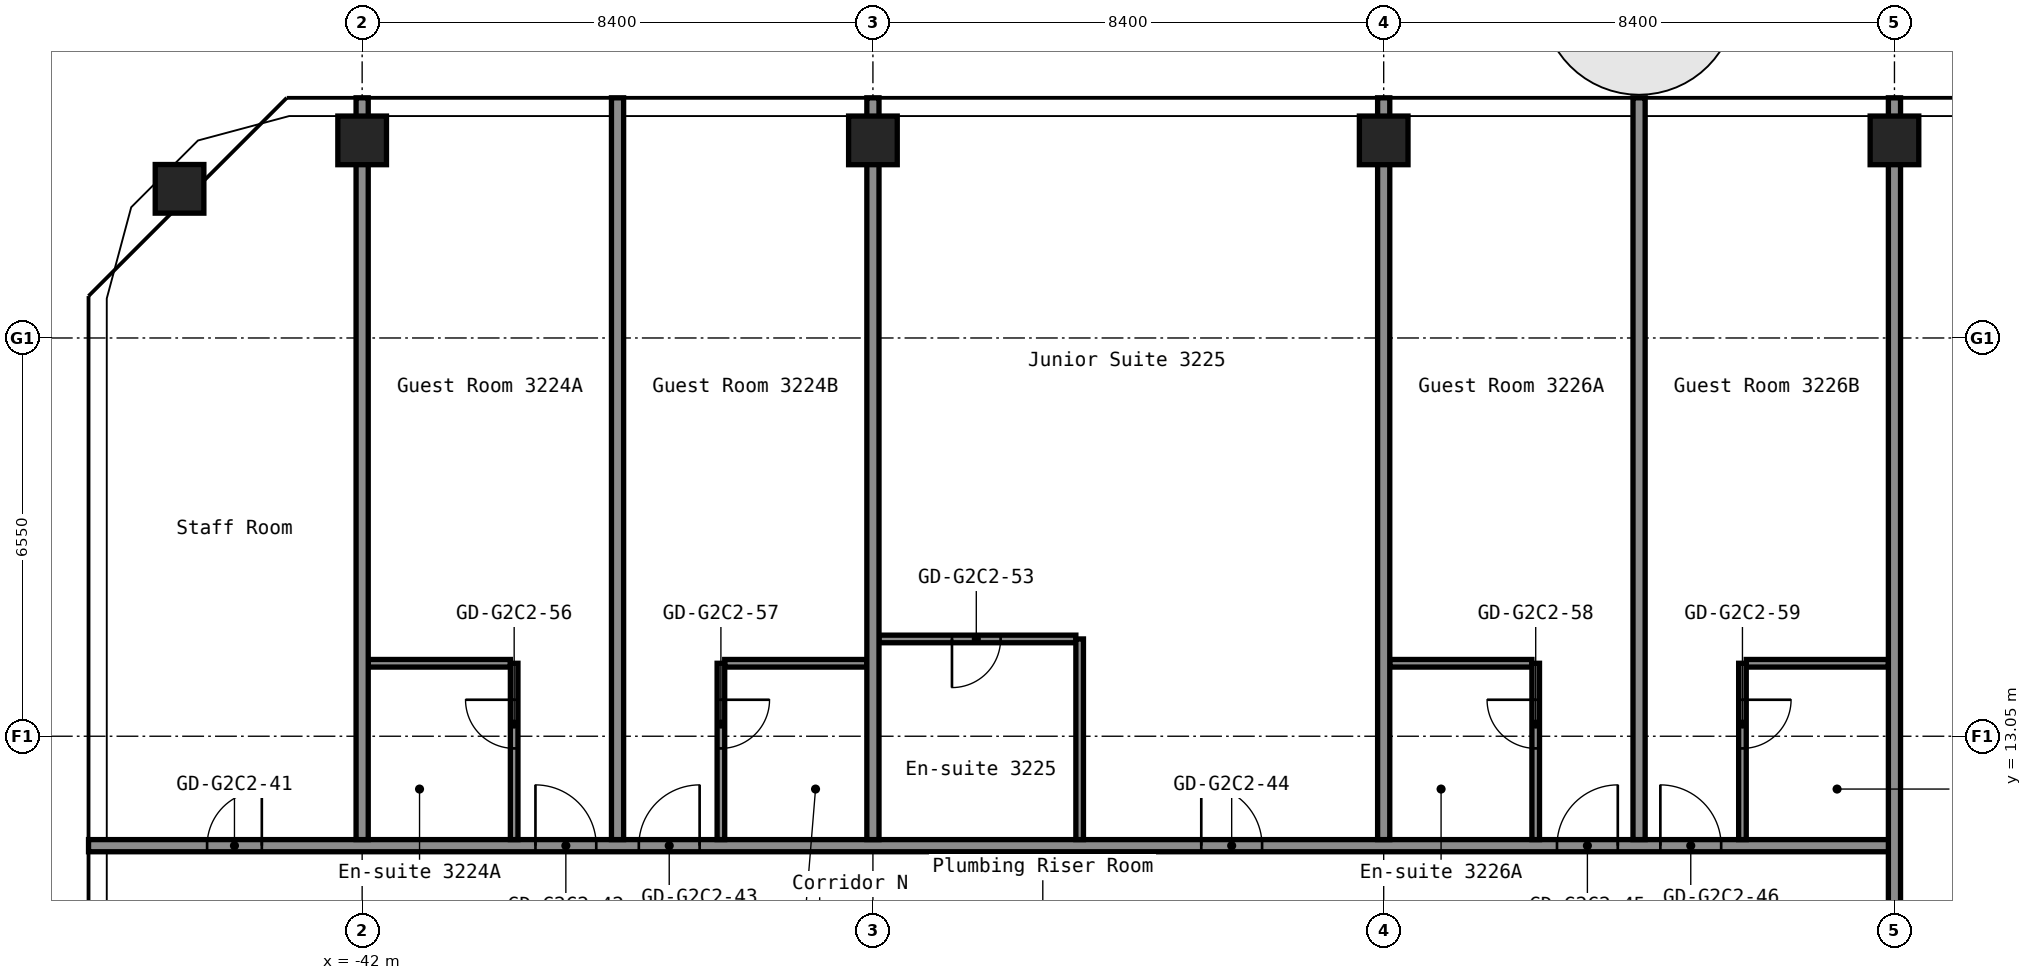
"""IFC4 building model, lengths in metres.
Left out: names, types, materials, properties, quantities, classifications, styles, units other than length and angle.
Written with IfcOpenShell. Run it as: python <this file> out.ifc"""

import sys

from ifc_helpers import new_model, si_unit, direction, frame, frame_2d, origin, origin_2d, place, context, subcontext, project, spatial, rectangle, hollow_rectangle, extrude, element, fill, save


model = new_model("IFC4")
c1 = context("Model", 3, precision=1e-05, world=origin(), true_north=direction((0.0, 1.0)))
c2 = subcontext(c1, "Body", "Model", "MODEL_VIEW")
j1 = project(units=[si_unit("LENGTHUNIT", "METRE"), si_unit("PLANEANGLEUNIT", "RADIAN")], contexts=[c1])
p1 = place(None, origin())
s1 = spatial("IfcSite", under=j1, at=p1, CompositionType="ELEMENT")
p2 = place(p1, origin())
s2 = spatial("IfcBuilding", under=s1, at=p2, CompositionType="ELEMENT")
p3 = place(p2, frame((0.0, 0.0, 113.8)))
s3 = spatial("IfcBuildingStorey", under=s2, at=p3, CompositionType="ELEMENT", Elevation=113.8)
for number, where, z_axis, x_axis in (
    (1, (-45.003, 22.053, 0.0), (0.0, 0.0, 1.0), (1.0, 0.0, 0.0)),
    (2, (-42.0, 22.85, 0.0), (0.0, 0.0, 1.0), (1.0, 0.0, 0.0)),
    (3, (-33.6, 22.85, 0.0), (0.0, 0.0, 1.0), (1.0, 0.0, 0.0)),
    (4, (-25.2, 22.85, 0.0), (0.0, 0.0, 1.0), (1.0, 0.0, 0.0)),
    (5, (-16.8, 22.85, 0.0), (0.0, 0.0, 1.0), (1.0, 0.0, 0.0)),
):
    element("IfcColumn", number, at=place(p3, frame(where, z_axis=z_axis, x_axis=x_axis)), inside=s3, PredefinedType="COLUMN", context=c2, shape_type="SweptSolid", body=[
        extrude(hollow_rectangle(XDim=0.8, YDim=0.8, WallThickness=0.032, at=origin_2d()), origin(), (0.0, 0.0, 1.0), 2.8),
    ])
p4 = place(p3, frame((-46.5, 11.25, 0.0), z_axis=(0.0, 0.0, 1.0), x_axis=(1.0, 0.0, 0.0)))
e6 = element("IfcWall", 6, at=p4, inside=s3, PredefinedType="PARTITIONING", context=c2, shape_type="SweptSolid", body=[
    extrude(rectangle(XDim=29.7, YDim=0.2, at=frame_2d((14.85, 0.0))), origin(), (0.0, 0.0, 1.0), 2.8),
])
p5 = place(p4, frame((1.95, 0.0, 0.0)))
e7 = element("IfcOpeningElement", 7, at=p5, cuts=e6, PredefinedType="OPENING", context=c2, shape_type="SweptSolid", body=[
    extrude(rectangle(XDim=0.9, YDim=2.1, at=frame_2d((0.45, 1.05))), frame((0.0, 0.11, 0.0), z_axis=(0.0, -1.0, 0.0), x_axis=(1.0, 0.0, 0.0)), (0.0, 0.0, 1.0), 0.22),
])
p6 = place(p4, frame((7.35, 0.0, 0.0)))
e8 = element("IfcOpeningElement", 8, at=p6, cuts=e6, PredefinedType="OPENING", context=c2, shape_type="SweptSolid", body=[
    extrude(rectangle(XDim=1.0, YDim=2.1, at=frame_2d((0.5, 1.05))), frame((0.0, 0.11, 0.0), z_axis=(0.0, -1.0, 0.0), x_axis=(1.0, 0.0, 0.0)), (0.0, 0.0, 1.0), 0.22),
])
p7 = place(p4, frame((9.05, 0.0, 0.0)))
e9 = element("IfcOpeningElement", 9, at=p7, cuts=e6, PredefinedType="OPENING", context=c2, shape_type="SweptSolid", body=[
    extrude(rectangle(XDim=1.0, YDim=2.1, at=frame_2d((0.5, 1.05))), frame((0.0, 0.11, 0.0), z_axis=(0.0, -1.0, 0.0), x_axis=(1.0, 0.0, 0.0)), (0.0, 0.0, 1.0), 0.22),
])
p8 = place(p4, frame((18.3, 0.0, 0.0)))
e10 = element("IfcOpeningElement", 10, at=p8, cuts=e6, PredefinedType="OPENING", context=c2, shape_type="SweptSolid", body=[
    extrude(rectangle(XDim=1.0, YDim=2.1, at=frame_2d((0.5, 1.05))), frame((0.0, 0.11, 0.0), z_axis=(0.0, -1.0, 0.0), x_axis=(1.0, 0.0, 0.0)), (0.0, 0.0, 1.0), 0.22),
])
p9 = place(p4, frame((24.15, 0.0, 0.0)))
e11 = element("IfcOpeningElement", 11, at=p9, cuts=e6, PredefinedType="OPENING", context=c2, shape_type="SweptSolid", body=[
    extrude(rectangle(XDim=1.0, YDim=2.1, at=frame_2d((0.5, 1.05))), frame((0.0, 0.11, 0.0), z_axis=(0.0, -1.0, 0.0), x_axis=(1.0, 0.0, 0.0)), (0.0, 0.0, 1.0), 0.22),
])
p10 = place(p4, frame((25.85, 0.0, 0.0)))
e12 = element("IfcOpeningElement", 12, at=p10, cuts=e6, PredefinedType="OPENING", context=c2, shape_type="SweptSolid", body=[
    extrude(rectangle(XDim=1.0, YDim=2.1, at=frame_2d((0.5, 1.05))), frame((0.0, 0.11, 0.0), z_axis=(0.0, -1.0, 0.0), x_axis=(1.0, 0.0, 0.0)), (0.0, 0.0, 1.0), 0.22),
])
p11 = place(p3, frame((-41.9, 14.25, 0.0), z_axis=(0.0, 0.0, 1.0), x_axis=(1.0, 0.0, 0.0)))
e13 = element("IfcWall", 13, at=p11, inside=s3, PredefinedType="PARTITIONING", context=c2, shape_type="SweptSolid", body=[
    extrude(rectangle(XDim=2.337, YDim=0.125, at=frame_2d((1.169, 0.0))), origin(), (0.0, 0.0, 1.0), 2.8),
])
for number, where, z_axis, x_axis in (
    (14, (-36.038, 14.25, 0.0), (0.0, 0.0, 1.0), (1.0, 0.0, 0.0)),
    (15, (-25.1, 14.25, 0.0), (0.0, 0.0, 1.0), (1.0, 0.0, 0.0)),
    (16, (-19.238, 14.25, 0.0), (0.0, 0.0, 1.0), (1.0, 0.0, 0.0)),
):
    element("IfcWall", number, at=place(p3, frame(where, z_axis=z_axis, x_axis=x_axis)), inside=s3, PredefinedType="PARTITIONING", context=c2, shape_type="SweptSolid", body=[
        extrude(rectangle(XDim=2.338, YDim=0.125, at=frame_2d((1.169, 0.0))), origin(), (0.0, 0.0, 1.0), 2.8),
    ])
p12 = place(p3, frame((-33.5, 14.65, 0.0), z_axis=(0.0, 0.0, 1.0), x_axis=(1.0, 0.0, 0.0)))
e17 = element("IfcWall", 17, at=p12, inside=s3, PredefinedType="PARTITIONING", context=c2, shape_type="SweptSolid", body=[
    extrude(rectangle(XDim=3.238, YDim=0.125, at=frame_2d((1.619, 0.0))), origin(), (0.0, 0.0, 1.0), 2.8),
])
p13 = place(p12, frame((1.2, 0.0, 0.0)))
e18 = element("IfcOpeningElement", 18, at=p13, cuts=e17, PredefinedType="OPENING", context=c2, shape_type="SweptSolid", body=[
    extrude(rectangle(XDim=0.8, YDim=2.1, at=frame_2d((0.4, 1.05))), frame((0.0, 0.073, 0.0), z_axis=(0.0, -1.0, 0.0), x_axis=(1.0, 0.0, 0.0)), (0.0, 0.0, 1.0), 0.145),
])
p14 = place(p3, frame((-42.0, 11.35, 0.0), z_axis=(0.0, 0.0, 1.0), x_axis=(0.0, 1.0, 0.0)))
e19 = element("IfcWall", 19, at=p14, inside=s3, PredefinedType="PARTITIONING", context=c2, shape_type="SweptSolid", body=[
    extrude(rectangle(XDim=12.2, YDim=0.2, at=frame_2d((6.1, 0.0))), origin(), (0.0, 0.0, 1.0), 2.8),
])
p15 = place(p3, frame((-39.5, 11.35, 0.0), z_axis=(0.0, 0.0, 1.0), x_axis=(0.0, 1.0, 0.0)))
e20 = element("IfcWall", 20, at=p15, inside=s3, PredefinedType="PARTITIONING", context=c2, shape_type="SweptSolid", body=[
    extrude(rectangle(XDim=2.9, YDim=0.125, at=frame_2d((1.45, 0.0))), origin(), (0.0, 0.0, 1.0), 2.8),
])
p16 = place(p15, frame((1.5, 0.0, 0.0)))
e21 = element("IfcOpeningElement", 21, at=p16, cuts=e20, PredefinedType="OPENING", context=c2, shape_type="SweptSolid", body=[
    extrude(rectangle(XDim=0.8, YDim=2.1, at=frame_2d((0.4, 1.05))), frame((0.0, 0.073, 0.0), z_axis=(0.0, -1.0, 0.0), x_axis=(1.0, 0.0, 0.0)), (0.0, 0.0, 1.0), 0.145),
])
p17 = place(p3, frame((-37.8, 11.35, 0.0), z_axis=(0.0, 0.0, 1.0), x_axis=(0.0, 1.0, 0.0)))
e22 = element("IfcWall", 22, at=p17, inside=s3, PredefinedType="PARTITIONING", context=c2, shape_type="SweptSolid", body=[
    extrude(rectangle(XDim=12.2, YDim=0.2, at=frame_2d((6.1, 0.0))), origin(), (0.0, 0.0, 1.0), 2.8),
])
p18 = place(p3, frame((-36.1, 11.35, 0.0), z_axis=(0.0, 0.0, 1.0), x_axis=(0.0, 1.0, 0.0)))
e23 = element("IfcWall", 23, at=p18, inside=s3, PredefinedType="PARTITIONING", context=c2, shape_type="SweptSolid", body=[
    extrude(rectangle(XDim=2.9, YDim=0.125, at=frame_2d((1.45, 0.0))), origin(), (0.0, 0.0, 1.0), 2.8),
])
p19 = place(p18, frame((1.5, 0.0, 0.0)))
e24 = element("IfcOpeningElement", 24, at=p19, cuts=e23, PredefinedType="OPENING", context=c2, shape_type="SweptSolid", body=[
    extrude(rectangle(XDim=0.8, YDim=2.1, at=frame_2d((0.4, 1.05))), frame((0.0, 0.073, 0.0), z_axis=(0.0, -1.0, 0.0), x_axis=(1.0, 0.0, 0.0)), (0.0, 0.0, 1.0), 0.145),
])
p20 = place(p3, frame((-33.6, 11.35, 0.0), z_axis=(0.0, 0.0, 1.0), x_axis=(0.0, 1.0, 0.0)))
e25 = element("IfcWall", 25, at=p20, inside=s3, PredefinedType="PARTITIONING", context=c2, shape_type="SweptSolid", body=[
    extrude(rectangle(XDim=12.2, YDim=0.2, at=frame_2d((6.1, 0.0))), origin(), (0.0, 0.0, 1.0), 2.8),
])
p21 = place(p3, frame((-30.2, 11.35, 0.0), z_axis=(0.0, 0.0, 1.0), x_axis=(0.0, 1.0, 0.0)))
e26 = element("IfcWall", 26, at=p21, inside=s3, PredefinedType="PARTITIONING", context=c2, shape_type="SweptSolid", body=[
    extrude(rectangle(XDim=3.3, YDim=0.125, at=frame_2d((1.65, 0.0))), origin(), (0.0, 0.0, 1.0), 2.8),
])
p22 = place(p3, frame((-25.2, 11.35, 0.0), z_axis=(0.0, 0.0, 1.0), x_axis=(0.0, 1.0, 0.0)))
e27 = element("IfcWall", 27, at=p22, inside=s3, PredefinedType="PARTITIONING", context=c2, shape_type="SweptSolid", body=[
    extrude(rectangle(XDim=12.2, YDim=0.2, at=frame_2d((6.1, 0.0))), origin(), (0.0, 0.0, 1.0), 2.8),
])
p23 = place(p3, frame((-22.7, 11.35, 0.0), z_axis=(0.0, 0.0, 1.0), x_axis=(0.0, 1.0, 0.0)))
e28 = element("IfcWall", 28, at=p23, inside=s3, PredefinedType="PARTITIONING", context=c2, shape_type="SweptSolid", body=[
    extrude(rectangle(XDim=2.9, YDim=0.125, at=frame_2d((1.45, 0.0))), origin(), (0.0, 0.0, 1.0), 2.8),
])
p24 = place(p23, frame((1.5, 0.0, 0.0)))
e29 = element("IfcOpeningElement", 29, at=p24, cuts=e28, PredefinedType="OPENING", context=c2, shape_type="SweptSolid", body=[
    extrude(rectangle(XDim=0.8, YDim=2.1, at=frame_2d((0.4, 1.05))), frame((0.0, 0.073, 0.0), z_axis=(0.0, -1.0, 0.0), x_axis=(1.0, 0.0, 0.0)), (0.0, 0.0, 1.0), 0.145),
])
p25 = place(p3, frame((-21.0, 11.35, 0.0), z_axis=(0.0, 0.0, 1.0), x_axis=(0.0, 1.0, 0.0)))
e30 = element("IfcWall", 30, at=p25, inside=s3, PredefinedType="PARTITIONING", context=c2, shape_type="SweptSolid", body=[
    extrude(rectangle(XDim=12.2, YDim=0.2, at=frame_2d((6.1, 0.0))), origin(), (0.0, 0.0, 1.0), 2.8),
])
p26 = place(p3, frame((-19.3, 11.35, 0.0), z_axis=(0.0, 0.0, 1.0), x_axis=(0.0, 1.0, 0.0)))
e31 = element("IfcWall", 31, at=p26, inside=s3, PredefinedType="PARTITIONING", context=c2, shape_type="SweptSolid", body=[
    extrude(rectangle(XDim=2.9, YDim=0.125, at=frame_2d((1.45, 0.0))), origin(), (0.0, 0.0, 1.0), 2.8),
])
p27 = place(p26, frame((1.5, 0.0, 0.0)))
e32 = element("IfcOpeningElement", 32, at=p27, cuts=e31, PredefinedType="OPENING", context=c2, shape_type="SweptSolid", body=[
    extrude(rectangle(XDim=0.8, YDim=2.1, at=frame_2d((0.4, 1.05))), frame((0.0, 0.073, 0.0), z_axis=(0.0, -1.0, 0.0), x_axis=(1.0, 0.0, 0.0)), (0.0, 0.0, 1.0), 0.145),
])
p28 = place(p3, frame((-16.8, 10.19, 0.0), z_axis=(0.0, 0.0, 1.0), x_axis=(0.0, 1.0, 0.0)))
e33 = element("IfcWall", 33, at=p28, inside=s3, PredefinedType="PARTITIONING", context=c2, shape_type="SweptSolid", body=[
    extrude(rectangle(XDim=13.36, YDim=0.2, at=frame_2d((6.68, 0.0))), origin(), (0.0, 0.0, 1.0), 2.8),
])
p29 = place(p5, origin())
e34 = element("IfcDoor", 34, at=p29, inside=s3, OperationType="SINGLE_SWING_LEFT", PredefinedType="DOOR", context=c2, shape_type="SweptSolid", body=[
    extrude(rectangle(XDim=0.9, YDim=2.1, at=frame_2d((0.45, 1.05))), frame((0.0, 0.025, 0.0), z_axis=(0.0, -1.0, 0.0), x_axis=(1.0, 0.0, 0.0)), (0.0, 0.0, 1.0), 0.05),
])
fill(e7, e34)
p30 = place(p6, origin())
e35 = element("IfcDoor", 35, at=p30, inside=s3, OperationType="SINGLE_SWING_RIGHT", PredefinedType="DOOR", context=c2, shape_type="SweptSolid", body=[
    extrude(rectangle(XDim=1.0, YDim=2.1, at=frame_2d((0.5, 1.05))), frame((0.0, 0.025, 0.0), z_axis=(0.0, -1.0, 0.0), x_axis=(1.0, 0.0, 0.0)), (0.0, 0.0, 1.0), 0.05),
])
fill(e8, e35)
p31 = place(p7, origin())
e36 = element("IfcDoor", 36, at=p31, inside=s3, OperationType="SINGLE_SWING_LEFT", PredefinedType="DOOR", context=c2, shape_type="SweptSolid", body=[
    extrude(rectangle(XDim=1.0, YDim=2.1, at=frame_2d((0.5, 1.05))), frame((0.0, 0.025, 0.0), z_axis=(0.0, -1.0, 0.0), x_axis=(1.0, 0.0, 0.0)), (0.0, 0.0, 1.0), 0.05),
])
fill(e9, e36)
p32 = place(p8, origin())
e37 = element("IfcDoor", 37, at=p32, inside=s3, OperationType="SINGLE_SWING_RIGHT", PredefinedType="DOOR", context=c2, shape_type="SweptSolid", body=[
    extrude(rectangle(XDim=1.0, YDim=2.1, at=frame_2d((0.5, 1.05))), frame((0.0, 0.025, 0.0), z_axis=(0.0, -1.0, 0.0), x_axis=(1.0, 0.0, 0.0)), (0.0, 0.0, 1.0), 0.05),
])
fill(e10, e37)
p33 = place(p9, origin())
e38 = element("IfcDoor", 38, at=p33, inside=s3, OperationType="SINGLE_SWING_LEFT", PredefinedType="DOOR", context=c2, shape_type="SweptSolid", body=[
    extrude(rectangle(XDim=1.0, YDim=2.1, at=frame_2d((0.5, 1.05))), frame((0.0, 0.025, 0.0), z_axis=(0.0, -1.0, 0.0), x_axis=(1.0, 0.0, 0.0)), (0.0, 0.0, 1.0), 0.05),
])
fill(e11, e38)
p34 = place(p10, origin())
e39 = element("IfcDoor", 39, at=p34, inside=s3, OperationType="SINGLE_SWING_RIGHT", PredefinedType="DOOR", context=c2, shape_type="SweptSolid", body=[
    extrude(rectangle(XDim=1.0, YDim=2.1, at=frame_2d((0.5, 1.05))), frame((0.0, 0.025, 0.0), z_axis=(0.0, -1.0, 0.0), x_axis=(1.0, 0.0, 0.0)), (0.0, 0.0, 1.0), 0.05),
])
fill(e12, e39)
p35 = place(p13, origin())
e40 = element("IfcDoor", 40, at=p35, inside=s3, OperationType="SINGLE_SWING_LEFT", PredefinedType="DOOR", context=c2, shape_type="SweptSolid", body=[
    extrude(rectangle(XDim=0.8, YDim=2.1, at=frame_2d((0.4, 1.05))), frame((0.0, 0.025, 0.0), z_axis=(0.0, -1.0, 0.0), x_axis=(1.0, 0.0, 0.0)), (0.0, 0.0, 1.0), 0.05),
])
fill(e18, e40)
p36 = place(p16, origin())
e41 = element("IfcDoor", 41, at=p36, inside=s3, OperationType="SINGLE_SWING_LEFT", PredefinedType="DOOR", context=c2, shape_type="SweptSolid", body=[
    extrude(rectangle(XDim=0.8, YDim=2.1, at=frame_2d((0.4, 1.05))), frame((0.0, 0.025, 0.0), z_axis=(0.0, -1.0, 0.0), x_axis=(1.0, 0.0, 0.0)), (0.0, 0.0, 1.0), 0.05),
])
fill(e21, e41)
p37 = place(p19, origin())
e42 = element("IfcDoor", 42, at=p37, inside=s3, OperationType="SINGLE_SWING_RIGHT", PredefinedType="DOOR", context=c2, shape_type="SweptSolid", body=[
    extrude(rectangle(XDim=0.8, YDim=2.1, at=frame_2d((0.4, 1.05))), frame((0.0, 0.025, 0.0), z_axis=(0.0, -1.0, 0.0), x_axis=(1.0, 0.0, 0.0)), (0.0, 0.0, 1.0), 0.05),
])
fill(e24, e42)
p38 = place(p24, origin())
e43 = element("IfcDoor", 43, at=p38, inside=s3, OperationType="SINGLE_SWING_LEFT", PredefinedType="DOOR", context=c2, shape_type="SweptSolid", body=[
    extrude(rectangle(XDim=0.8, YDim=2.1, at=frame_2d((0.4, 1.05))), frame((0.0, 0.025, 0.0), z_axis=(0.0, -1.0, 0.0), x_axis=(1.0, 0.0, 0.0)), (0.0, 0.0, 1.0), 0.05),
])
fill(e29, e43)
p39 = place(p27, origin())
e44 = element("IfcDoor", 44, at=p39, inside=s3, OperationType="SINGLE_SWING_RIGHT", PredefinedType="DOOR", context=c2, shape_type="SweptSolid", body=[
    extrude(rectangle(XDim=0.8, YDim=2.1, at=frame_2d((0.4, 1.05))), frame((0.0, 0.025, 0.0), z_axis=(0.0, -1.0, 0.0), x_axis=(1.0, 0.0, 0.0)), (0.0, 0.0, 1.0), 0.05),
])
fill(e32, e44)
save(model, sys.argv[1])
